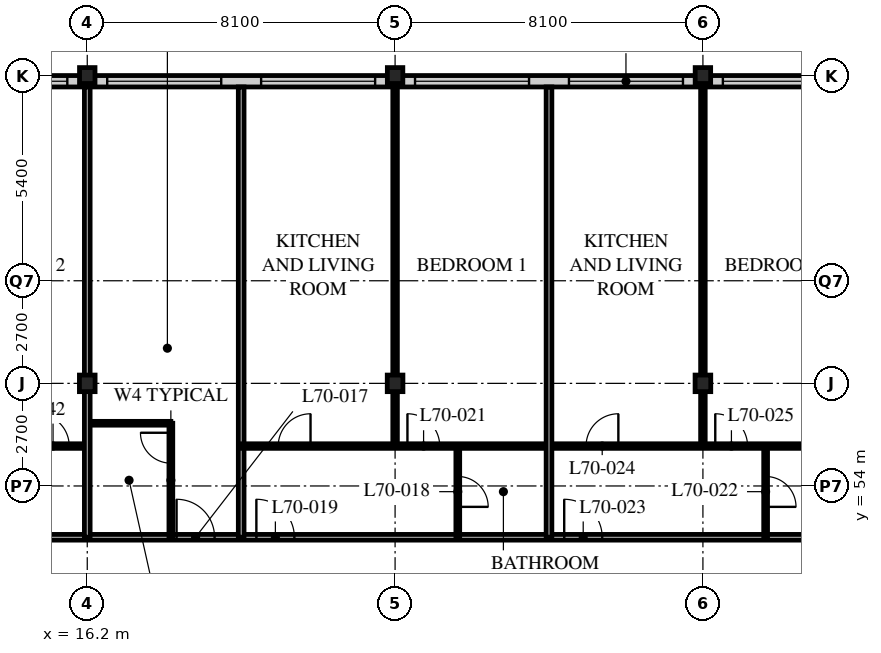
"""IFC4 building model, lengths in metres.
Left out: names, types, materials, properties, quantities, classifications, styles, units other than length and angle.
Written with IfcOpenShell. Run it as: python <this file> out.ifc"""

import sys

from ifc_helpers import new_model, si_unit, direction, frame, frame_2d, origin, origin_2d, place, context, subcontext, project, spatial, rectangle, i_section, extrude, element, fill, save


model = new_model("IFC4")
c1 = context("Model", 3, precision=1e-05, world=origin(), true_north=direction((0.0, 1.0)))
c2 = subcontext(c1, "Body", "Model", "MODEL_VIEW")
j1 = project(units=[si_unit("LENGTHUNIT", "METRE"), si_unit("PLANEANGLEUNIT", "RADIAN")], contexts=[c1])
p1 = place(None, origin())
s1 = spatial("IfcSite", under=j1, at=p1, CompositionType="ELEMENT")
p2 = place(p1, origin())
s2 = spatial("IfcBuilding", under=s1, at=p2, CompositionType="ELEMENT")
p3 = place(p2, frame((0.0, 0.0, 273.6)))
s3 = spatial("IfcBuildingStorey", under=s2, at=p3, CompositionType="ELEMENT", Elevation=273.6)
p4 = place(p3, frame((16.2, 56.7, 0.0), z_axis=(0.0, 0.0, 1.0), x_axis=(1.0, 0.0, 0.0)))
e1 = element("IfcColumn", 1, at=p4, inside=s3, PredefinedType="COLUMN", context=c2, shape_type="SweptSolid", body=[
    extrude(i_section(OverallWidth=0.412, OverallDepth=0.437, WebThickness=0.036, FlangeThickness=0.058, FilletRadius=0.015, at=origin_2d()), origin(), (0.0, 0.0, 1.0), 3.9),
])
p5 = place(p3, frame((16.2, 64.8, 0.0), z_axis=(0.0, 0.0, 1.0), x_axis=(1.0, 0.0, 0.0)))
e2 = element("IfcColumn", 2, at=p5, inside=s3, PredefinedType="COLUMN", context=c2, shape_type="SweptSolid", body=[
    extrude(i_section(OverallWidth=0.407, OverallDepth=0.419, WebThickness=0.031, FlangeThickness=0.049, FilletRadius=0.015, at=origin_2d()), origin(), (0.0, 0.0, 1.0), 3.9),
])
p6 = place(p3, frame((24.3, 56.7, 0.0), z_axis=(0.0, 0.0, 1.0), x_axis=(1.0, 0.0, 0.0)))
e3 = element("IfcColumn", 3, at=p6, inside=s3, PredefinedType="COLUMN", context=c2, shape_type="SweptSolid", body=[
    extrude(i_section(OverallWidth=0.412, OverallDepth=0.437, WebThickness=0.036, FlangeThickness=0.058, FilletRadius=0.015, at=origin_2d()), origin(), (0.0, 0.0, 1.0), 3.9),
])
p7 = place(p3, frame((24.3, 64.8, 0.0), z_axis=(0.0, 0.0, 1.0), x_axis=(1.0, 0.0, 0.0)))
e4 = element("IfcColumn", 4, at=p7, inside=s3, PredefinedType="COLUMN", context=c2, shape_type="SweptSolid", body=[
    extrude(i_section(OverallWidth=0.407, OverallDepth=0.419, WebThickness=0.031, FlangeThickness=0.049, FilletRadius=0.015, at=origin_2d()), origin(), (0.0, 0.0, 1.0), 3.9),
])
p8 = place(p3, frame((32.4, 56.7, 0.0), z_axis=(0.0, 0.0, 1.0), x_axis=(1.0, 0.0, 0.0)))
e5 = element("IfcColumn", 5, at=p8, inside=s3, PredefinedType="COLUMN", context=c2, shape_type="SweptSolid", body=[
    extrude(i_section(OverallWidth=0.412, OverallDepth=0.437, WebThickness=0.036, FlangeThickness=0.058, FilletRadius=0.015, at=origin_2d()), origin(), (0.0, 0.0, 1.0), 3.9),
])
p9 = place(p3, frame((32.4, 64.8, 0.0), z_axis=(0.0, 0.0, 1.0), x_axis=(1.0, 0.0, 0.0)))
e6 = element("IfcColumn", 6, at=p9, inside=s3, PredefinedType="COLUMN", context=c2, shape_type="SweptSolid", body=[
    extrude(i_section(OverallWidth=0.407, OverallDepth=0.419, WebThickness=0.031, FlangeThickness=0.049, FilletRadius=0.015, at=origin_2d()), origin(), (0.0, 0.0, 1.0), 3.9),
])
p10 = place(p3, frame((48.3, 64.65, 0.0), z_axis=(0.0, 0.0, 1.0), x_axis=(-1.0, 0.0, 0.0)))
e7 = element("IfcWall", 7, at=p10, inside=s3, PredefinedType="SOLIDWALL", context=c2, shape_type="SweptSolid", body=[
    extrude(rectangle(XDim=40.2, YDim=0.3, at=frame_2d((20.1, 0.0))), origin(), (0.0, 0.0, 1.0), 3.69),
])
p11 = place(p10, frame((0.225, 0.0, 0.6)))
e8 = element("IfcOpeningElement", 8, at=p11, cuts=e7, PredefinedType="OPENING", context=c2, shape_type="SweptSolid", body=[
    extrude(rectangle(XDim=3.0, YDim=2.4, at=frame_2d((1.5, 1.2))), frame((0.0, 0.16, 0.0), z_axis=(0.0, -1.0, 0.0), x_axis=(1.0, 0.0, 0.0)), (0.0, 0.0, 1.0), 0.32),
])
p12 = place(p10, frame((4.275, 0.0, 0.6)))
e9 = element("IfcOpeningElement", 9, at=p12, cuts=e7, PredefinedType="OPENING", context=c2, shape_type="SweptSolid", body=[
    extrude(rectangle(XDim=3.0, YDim=2.4, at=frame_2d((1.5, 1.2))), frame((0.0, 0.16, 0.0), z_axis=(0.0, -1.0, 0.0), x_axis=(1.0, 0.0, 0.0)), (0.0, 0.0, 1.0), 0.32),
])
p13 = place(p10, frame((8.325, 0.0, 0.6)))
e10 = element("IfcOpeningElement", 10, at=p13, cuts=e7, PredefinedType="OPENING", context=c2, shape_type="SweptSolid", body=[
    extrude(rectangle(XDim=3.0, YDim=2.4, at=frame_2d((1.5, 1.2))), frame((0.0, 0.16, 0.0), z_axis=(0.0, -1.0, 0.0), x_axis=(1.0, 0.0, 0.0)), (0.0, 0.0, 1.0), 0.32),
])
p14 = place(p10, frame((12.375, 0.0, 0.6)))
e11 = element("IfcOpeningElement", 11, at=p14, cuts=e7, PredefinedType="OPENING", context=c2, shape_type="SweptSolid", body=[
    extrude(rectangle(XDim=3.0, YDim=2.4, at=frame_2d((1.5, 1.2))), frame((0.0, 0.16, 0.0), z_axis=(0.0, -1.0, 0.0), x_axis=(1.0, 0.0, 0.0)), (0.0, 0.0, 1.0), 0.32),
])
p15 = place(p10, frame((16.425, 0.0, 0.6)))
e12 = element("IfcOpeningElement", 12, at=p15, cuts=e7, PredefinedType="OPENING", context=c2, shape_type="SweptSolid", body=[
    extrude(rectangle(XDim=3.0, YDim=2.4, at=frame_2d((1.5, 1.2))), frame((0.0, 0.16, 0.0), z_axis=(0.0, -1.0, 0.0), x_axis=(1.0, 0.0, 0.0)), (0.0, 0.0, 1.0), 0.32),
])
p16 = place(p10, frame((20.475, 0.0, 0.6)))
e13 = element("IfcOpeningElement", 13, at=p16, cuts=e7, PredefinedType="OPENING", context=c2, shape_type="SweptSolid", body=[
    extrude(rectangle(XDim=3.0, YDim=2.4, at=frame_2d((1.5, 1.2))), frame((0.0, 0.16, 0.0), z_axis=(0.0, -1.0, 0.0), x_axis=(1.0, 0.0, 0.0)), (0.0, 0.0, 1.0), 0.32),
])
p17 = place(p10, frame((24.525, 0.0, 0.6)))
e14 = element("IfcOpeningElement", 14, at=p17, cuts=e7, PredefinedType="OPENING", context=c2, shape_type="SweptSolid", body=[
    extrude(rectangle(XDim=3.0, YDim=2.4, at=frame_2d((1.5, 1.2))), frame((0.0, 0.16, 0.0), z_axis=(0.0, -1.0, 0.0), x_axis=(1.0, 0.0, 0.0)), (0.0, 0.0, 1.0), 0.32),
])
p18 = place(p10, frame((28.575, 0.0, 0.6)))
e15 = element("IfcOpeningElement", 15, at=p18, cuts=e7, PredefinedType="OPENING", context=c2, shape_type="SweptSolid", body=[
    extrude(rectangle(XDim=3.0, YDim=2.4, at=frame_2d((1.5, 1.2))), frame((0.0, 0.16, 0.0), z_axis=(0.0, -1.0, 0.0), x_axis=(1.0, 0.0, 0.0)), (0.0, 0.0, 1.0), 0.32),
])
p19 = place(p10, frame((32.625, 0.0, 0.6)))
e16 = element("IfcOpeningElement", 16, at=p19, cuts=e7, PredefinedType="OPENING", context=c2, shape_type="SweptSolid", body=[
    extrude(rectangle(XDim=3.0, YDim=2.4, at=frame_2d((1.5, 1.2))), frame((0.0, 0.16, 0.0), z_axis=(0.0, -1.0, 0.0), x_axis=(1.0, 0.0, 0.0)), (0.0, 0.0, 1.0), 0.32),
])
p20 = place(p10, frame((36.675, 0.0, 0.6)))
e17 = element("IfcOpeningElement", 17, at=p20, cuts=e7, PredefinedType="OPENING", context=c2, shape_type="SweptSolid", body=[
    extrude(rectangle(XDim=3.0, YDim=2.4, at=frame_2d((1.5, 1.2))), frame((0.0, 0.16, 0.0), z_axis=(0.0, -1.0, 0.0), x_axis=(1.0, 0.0, 0.0)), (0.0, 0.0, 1.0), 0.32),
])
p21 = place(p3, frame((12.15, 52.65, 0.0), z_axis=(0.0, 0.0, 1.0), x_axis=(1.0, 0.0, 0.0)))
e18 = element("IfcWall", 18, at=p21, inside=s3, PredefinedType="PARTITIONING", context=c2, shape_type="SweptSolid", body=[
    extrude(rectangle(XDim=24.3, YDim=0.15, at=frame_2d((12.15, 0.0))), origin(), (0.0, 0.0, 1.0), 3.69),
])
p22 = place(p21, frame((6.4, 0.0, 0.0)))
e19 = element("IfcOpeningElement", 19, at=p22, cuts=e18, PredefinedType="OPENING", context=c2, shape_type="SweptSolid", body=[
    extrude(rectangle(XDim=1.0, YDim=2.1, at=frame_2d((0.5, 1.05))), frame((0.0, 0.085, 0.0), z_axis=(0.0, -1.0, 0.0), x_axis=(1.0, 0.0, 0.0)), (0.0, 0.0, 1.0), 0.17),
])
p23 = place(p21, frame((8.5, 0.0, 0.0)))
e20 = element("IfcOpeningElement", 20, at=p23, cuts=e18, PredefinedType="OPENING", context=c2, shape_type="SweptSolid", body=[
    extrude(rectangle(XDim=1.0, YDim=2.1, at=frame_2d((0.5, 1.05))), frame((0.0, 0.085, 0.0), z_axis=(0.0, -1.0, 0.0), x_axis=(1.0, 0.0, 0.0)), (0.0, 0.0, 1.0), 0.17),
])
p24 = place(p21, frame((16.6, 0.0, 0.0)))
e21 = element("IfcOpeningElement", 21, at=p24, cuts=e18, PredefinedType="OPENING", context=c2, shape_type="SweptSolid", body=[
    extrude(rectangle(XDim=1.0, YDim=2.1, at=frame_2d((0.5, 1.05))), frame((0.0, 0.085, 0.0), z_axis=(0.0, -1.0, 0.0), x_axis=(1.0, 0.0, 0.0)), (0.0, 0.0, 1.0), 0.17),
])
p25 = place(p21, frame((1.525, 0.0, 0.0)))
e22 = element("IfcOpeningElement", 22, at=p25, cuts=e18, PredefinedType="OPENING", context=c2, shape_type="SweptSolid", body=[
    extrude(rectangle(XDim=1.0, YDim=2.1, at=frame_2d((0.5, 1.05))), frame((0.0, 0.085, 0.0), z_axis=(0.0, -1.0, 0.0), x_axis=(1.0, 0.0, 0.0)), (0.0, 0.0, 1.0), 0.17),
])
p26 = place(p3, frame((16.2, 55.65, 0.0), z_axis=(0.0, 0.0, 1.0), x_axis=(1.0, 0.0, 0.0)))
e23 = element("IfcWall", 23, at=p26, inside=s3, PredefinedType="PARTITIONING", context=c2, shape_type="SweptSolid", body=[
    extrude(rectangle(XDim=2.2, YDim=0.1, at=frame_2d((1.1, 0.0))), origin(), (0.0, 0.0, 1.0), 3.69),
])
p27 = place(p3, frame((18.4, 52.65, 0.0), z_axis=(0.0, 0.0, 1.0), x_axis=(0.0, 1.0, 0.0)))
e24 = element("IfcWall", 24, at=p27, inside=s3, PredefinedType="PARTITIONING", context=c2, shape_type="SweptSolid", body=[
    extrude(rectangle(XDim=3.0, YDim=0.1, at=frame_2d((1.5, 0.0))), origin(), (0.0, 0.0, 1.0), 3.69),
])
p28 = place(p27, frame((1.95, 0.0, 0.0)))
e25 = element("IfcOpeningElement", 25, at=p28, cuts=e24, PredefinedType="OPENING", context=c2, shape_type="SweptSolid", body=[
    extrude(rectangle(XDim=0.8, YDim=2.1, at=frame_2d((0.4, 1.05))), frame((0.0, 0.06, 0.0), z_axis=(0.0, -1.0, 0.0), x_axis=(1.0, 0.0, 0.0)), (0.0, 0.0, 1.0), 0.12),
])
p29 = place(p3, frame((20.25, 52.65, 0.0), z_axis=(0.0, 0.0, 1.0), x_axis=(0.0, 1.0, 0.0)))
e26 = element("IfcWall", 26, at=p29, inside=s3, PredefinedType="PARTITIONING", context=c2, shape_type="SweptSolid", body=[
    extrude(rectangle(XDim=11.85, YDim=0.15, at=frame_2d((5.925, 0.0))), origin(), (0.0, 0.0, 1.0), 3.69),
])
p30 = place(p3, frame((20.25, 55.05, 0.0), z_axis=(0.0, 0.0, 1.0), x_axis=(1.0, 0.0, 0.0)))
e27 = element("IfcWall", 27, at=p30, inside=s3, PredefinedType="PARTITIONING", context=c2, shape_type="SweptSolid", body=[
    extrude(rectangle(XDim=16.2, YDim=0.12, at=frame_2d((8.1, 0.0))), origin(), (0.0, 0.0, 1.0), 3.69),
])
p31 = place(p30, frame((0.975, 0.0, 0.0)))
e28 = element("IfcOpeningElement", 28, at=p31, cuts=e27, PredefinedType="OPENING", context=c2, shape_type="SweptSolid", body=[
    extrude(rectangle(XDim=0.85, YDim=2.1, at=frame_2d((0.425, 1.05))), frame((0.0, 0.07, 0.0), z_axis=(0.0, -1.0, 0.0), x_axis=(1.0, 0.0, 0.0)), (0.0, 0.0, 1.0), 0.14),
])
p32 = place(p30, frame((4.375, 0.0, 0.0)))
e29 = element("IfcOpeningElement", 29, at=p32, cuts=e27, PredefinedType="OPENING", context=c2, shape_type="SweptSolid", body=[
    extrude(rectangle(XDim=0.85, YDim=2.1, at=frame_2d((0.425, 1.05))), frame((0.0, 0.07, 0.0), z_axis=(0.0, -1.0, 0.0), x_axis=(1.0, 0.0, 0.0)), (0.0, 0.0, 1.0), 0.14),
])
p33 = place(p30, frame((9.075, 0.0, 0.0)))
e30 = element("IfcOpeningElement", 30, at=p33, cuts=e27, PredefinedType="OPENING", context=c2, shape_type="SweptSolid", body=[
    extrude(rectangle(XDim=0.85, YDim=2.1, at=frame_2d((0.425, 1.05))), frame((0.0, 0.07, 0.0), z_axis=(0.0, -1.0, 0.0), x_axis=(1.0, 0.0, 0.0)), (0.0, 0.0, 1.0), 0.14),
])
p34 = place(p30, frame((12.475, 0.0, 0.0)))
e31 = element("IfcOpeningElement", 31, at=p34, cuts=e27, PredefinedType="OPENING", context=c2, shape_type="SweptSolid", body=[
    extrude(rectangle(XDim=0.85, YDim=2.1, at=frame_2d((0.425, 1.05))), frame((0.0, 0.07, 0.0), z_axis=(0.0, -1.0, 0.0), x_axis=(1.0, 0.0, 0.0)), (0.0, 0.0, 1.0), 0.14),
])
p35 = place(p3, frame((25.95, 52.65, 0.0), z_axis=(0.0, 0.0, 1.0), x_axis=(0.0, 1.0, 0.0)))
e32 = element("IfcWall", 32, at=p35, inside=s3, PredefinedType="PARTITIONING", context=c2, shape_type="SweptSolid", body=[
    extrude(rectangle(XDim=2.4, YDim=0.1, at=frame_2d((1.2, 0.0))), origin(), (0.0, 0.0, 1.0), 3.69),
])
p36 = place(p35, frame((0.8, 0.0, 0.0)))
e33 = element("IfcOpeningElement", 33, at=p36, cuts=e32, PredefinedType="OPENING", context=c2, shape_type="SweptSolid", body=[
    extrude(rectangle(XDim=0.8, YDim=2.1, at=frame_2d((0.4, 1.05))), frame((0.0, 0.06, 0.0), z_axis=(0.0, -1.0, 0.0), x_axis=(1.0, 0.0, 0.0)), (0.0, 0.0, 1.0), 0.12),
])
p37 = place(p3, frame((24.3, 55.05, 0.0), z_axis=(0.0, 0.0, 1.0), x_axis=(0.0, 1.0, 0.0)))
e34 = element("IfcWall", 34, at=p37, inside=s3, PredefinedType="PARTITIONING", context=c2, shape_type="SweptSolid", body=[
    extrude(rectangle(XDim=9.45, YDim=0.12, at=frame_2d((4.725, 0.0))), origin(), (0.0, 0.0, 1.0), 3.078),
])
p38 = place(p3, frame((28.35, 52.65, 0.0), z_axis=(0.0, 0.0, 1.0), x_axis=(0.0, 1.0, 0.0)))
e35 = element("IfcWall", 35, at=p38, inside=s3, PredefinedType="PARTITIONING", context=c2, shape_type="SweptSolid", body=[
    extrude(rectangle(XDim=11.85, YDim=0.15, at=frame_2d((5.925, 0.0))), origin(), (0.0, 0.0, 1.0), 3.69),
])
p39 = place(p3, frame((34.05, 52.65, 0.0), z_axis=(0.0, 0.0, 1.0), x_axis=(0.0, 1.0, 0.0)))
e36 = element("IfcWall", 36, at=p39, inside=s3, PredefinedType="PARTITIONING", context=c2, shape_type="SweptSolid", body=[
    extrude(rectangle(XDim=2.4, YDim=0.1, at=frame_2d((1.2, 0.0))), origin(), (0.0, 0.0, 1.0), 3.69),
])
p40 = place(p39, frame((0.8, 0.0, 0.0)))
e37 = element("IfcOpeningElement", 37, at=p40, cuts=e36, PredefinedType="OPENING", context=c2, shape_type="SweptSolid", body=[
    extrude(rectangle(XDim=0.8, YDim=2.1, at=frame_2d((0.4, 1.05))), frame((0.0, 0.06, 0.0), z_axis=(0.0, -1.0, 0.0), x_axis=(1.0, 0.0, 0.0)), (0.0, 0.0, 1.0), 0.12),
])
p41 = place(p3, frame((32.4, 55.05, 0.0), z_axis=(0.0, 0.0, 1.0), x_axis=(0.0, 1.0, 0.0)))
e38 = element("IfcWall", 38, at=p41, inside=s3, PredefinedType="PARTITIONING", context=c2, shape_type="SweptSolid", body=[
    extrude(rectangle(XDim=9.45, YDim=0.12, at=frame_2d((4.725, 0.0))), origin(), (0.0, 0.0, 1.0), 3.078),
])
p42 = place(p3, frame((8.15, 55.05, 0.0), z_axis=(0.0, 0.0, 1.0), x_axis=(1.0, 0.0, 0.0)))
e39 = element("IfcWall", 39, at=p42, inside=s3, PredefinedType="PARTITIONING", context=c2, shape_type="SweptSolid", body=[
    extrude(rectangle(XDim=8.05, YDim=0.12, at=frame_2d((4.025, 0.0))), origin(), (0.0, 0.0, 1.0), 3.69),
])
p43 = place(p42, frame((6.725, 0.0, 0.0)))
e40 = element("IfcOpeningElement", 40, at=p43, cuts=e39, PredefinedType="OPENING", context=c2, shape_type="SweptSolid", body=[
    extrude(rectangle(XDim=0.85, YDim=2.1, at=frame_2d((0.425, 1.05))), frame((0.0, 0.07, 0.0), z_axis=(0.0, -1.0, 0.0), x_axis=(1.0, 0.0, 0.0)), (0.0, 0.0, 1.0), 0.14),
])
p44 = place(p42, frame((2.875, 0.0, 0.0)))
e41 = element("IfcOpeningElement", 41, at=p44, cuts=e39, PredefinedType="OPENING", context=c2, shape_type="SweptSolid", body=[
    extrude(rectangle(XDim=0.85, YDim=2.1, at=frame_2d((0.425, 1.05))), frame((0.0, 0.07, 0.0), z_axis=(0.0, -1.0, 0.0), x_axis=(1.0, 0.0, 0.0)), (0.0, 0.0, 1.0), 0.14),
])
p45 = place(p3, frame((16.2, 52.65, 0.0), z_axis=(0.0, 0.0, 1.0), x_axis=(0.0, 1.0, 0.0)))
e42 = element("IfcWall", 42, at=p45, inside=s3, PredefinedType="PARTITIONING", context=c2, shape_type="SweptSolid", body=[
    extrude(rectangle(XDim=11.85, YDim=0.15, at=frame_2d((5.925, 0.0))), origin(), (0.0, 0.0, 1.0), 3.078),
])
p46 = place(p14, origin())
e43 = element("IfcWindow", 43, at=p46, inside=s3, PartitioningType="SINGLE_PANEL", PredefinedType="WINDOW", context=c2, shape_type="SweptSolid", body=[
    extrude(rectangle(XDim=3.0, YDim=2.4, at=frame_2d((1.5, 1.2))), frame((0.0, 0.03, 0.0), z_axis=(0.0, -1.0, 0.0), x_axis=(1.0, 0.0, 0.0)), (0.0, 0.0, 1.0), 0.06),
])
fill(e11, e43)
p47 = place(p15, origin())
e44 = element("IfcWindow", 44, at=p47, inside=s3, PartitioningType="SINGLE_PANEL", PredefinedType="WINDOW", context=c2, shape_type="SweptSolid", body=[
    extrude(rectangle(XDim=3.0, YDim=2.4, at=frame_2d((1.5, 1.2))), frame((0.0, 0.03, 0.0), z_axis=(0.0, -1.0, 0.0), x_axis=(1.0, 0.0, 0.0)), (0.0, 0.0, 1.0), 0.06),
])
fill(e12, e44)
p48 = place(p16, origin())
e45 = element("IfcWindow", 45, at=p48, inside=s3, PartitioningType="SINGLE_PANEL", PredefinedType="WINDOW", context=c2, shape_type="SweptSolid", body=[
    extrude(rectangle(XDim=3.0, YDim=2.4, at=frame_2d((1.5, 1.2))), frame((0.0, 0.03, 0.0), z_axis=(0.0, -1.0, 0.0), x_axis=(1.0, 0.0, 0.0)), (0.0, 0.0, 1.0), 0.06),
])
fill(e13, e45)
p49 = place(p17, origin())
e46 = element("IfcWindow", 46, at=p49, inside=s3, PartitioningType="SINGLE_PANEL", PredefinedType="WINDOW", context=c2, shape_type="SweptSolid", body=[
    extrude(rectangle(XDim=3.0, YDim=2.4, at=frame_2d((1.5, 1.2))), frame((0.0, 0.03, 0.0), z_axis=(0.0, -1.0, 0.0), x_axis=(1.0, 0.0, 0.0)), (0.0, 0.0, 1.0), 0.06),
])
fill(e14, e46)
p50 = place(p18, origin())
e47 = element("IfcWindow", 47, at=p50, inside=s3, PartitioningType="SINGLE_PANEL", PredefinedType="WINDOW", context=c2, shape_type="SweptSolid", body=[
    extrude(rectangle(XDim=3.0, YDim=2.4, at=frame_2d((1.5, 1.2))), frame((0.0, 0.03, 0.0), z_axis=(0.0, -1.0, 0.0), x_axis=(1.0, 0.0, 0.0)), (0.0, 0.0, 1.0), 0.06),
])
fill(e15, e47)
p51 = place(p19, origin())
e48 = element("IfcWindow", 48, at=p51, inside=s3, PartitioningType="SINGLE_PANEL", PredefinedType="WINDOW", context=c2, shape_type="SweptSolid", body=[
    extrude(rectangle(XDim=3.0, YDim=2.4, at=frame_2d((1.5, 1.2))), frame((0.0, 0.03, 0.0), z_axis=(0.0, -1.0, 0.0), x_axis=(1.0, 0.0, 0.0)), (0.0, 0.0, 1.0), 0.06),
])
fill(e16, e48)
p52 = place(p28, origin())
e49 = element("IfcDoor", 49, at=p52, inside=s3, OperationType="SINGLE_SWING_RIGHT", PredefinedType="DOOR", context=c2, shape_type="SweptSolid", body=[
    extrude(rectangle(XDim=0.8, YDim=2.1, at=frame_2d((0.4, 1.05))), frame((0.0, 0.025, 0.0), z_axis=(0.0, -1.0, 0.0), x_axis=(1.0, 0.0, 0.0)), (0.0, 0.0, 1.0), 0.05),
])
fill(e25, e49)
p53 = place(p22, origin())
e50 = element("IfcDoor", 50, at=p53, inside=s3, OperationType="SINGLE_SWING_LEFT", PredefinedType="DOOR", context=c2, shape_type="SweptSolid", body=[
    extrude(rectangle(XDim=1.0, YDim=2.1, at=frame_2d((0.5, 1.05))), frame((0.0, 0.025, 0.0), z_axis=(0.0, -1.0, 0.0), x_axis=(1.0, 0.0, 0.0)), (0.0, 0.0, 1.0), 0.05),
])
fill(e19, e50)
p54 = place(p36, origin())
e51 = element("IfcDoor", 51, at=p54, inside=s3, OperationType="SINGLE_SWING_RIGHT", PredefinedType="DOOR", context=c2, shape_type="SweptSolid", body=[
    extrude(rectangle(XDim=0.8, YDim=2.1, at=frame_2d((0.4, 1.05))), frame((0.0, 0.025, 0.0), z_axis=(0.0, -1.0, 0.0), x_axis=(1.0, 0.0, 0.0)), (0.0, 0.0, 1.0), 0.05),
])
fill(e33, e51)
p55 = place(p23, origin())
e52 = element("IfcDoor", 52, at=p55, inside=s3, OperationType="SINGLE_SWING_LEFT", PredefinedType="DOOR", context=c2, shape_type="SweptSolid", body=[
    extrude(rectangle(XDim=1.0, YDim=2.1, at=frame_2d((0.5, 1.05))), frame((0.0, 0.025, 0.0), z_axis=(0.0, -1.0, 0.0), x_axis=(1.0, 0.0, 0.0)), (0.0, 0.0, 1.0), 0.05),
])
fill(e20, e52)
p56 = place(p31, origin())
e53 = element("IfcDoor", 53, at=p56, inside=s3, OperationType="SINGLE_SWING_RIGHT", PredefinedType="DOOR", context=c2, shape_type="SweptSolid", body=[
    extrude(rectangle(XDim=0.85, YDim=2.1, at=frame_2d((0.425, 1.05))), frame((0.0, 0.025, 0.0), z_axis=(0.0, -1.0, 0.0), x_axis=(1.0, 0.0, 0.0)), (0.0, 0.0, 1.0), 0.05),
])
fill(e28, e53)
p57 = place(p32, origin())
e54 = element("IfcDoor", 54, at=p57, inside=s3, OperationType="SINGLE_SWING_LEFT", PredefinedType="DOOR", context=c2, shape_type="SweptSolid", body=[
    extrude(rectangle(XDim=0.85, YDim=2.1, at=frame_2d((0.425, 1.05))), frame((0.0, 0.025, 0.0), z_axis=(0.0, -1.0, 0.0), x_axis=(1.0, 0.0, 0.0)), (0.0, 0.0, 1.0), 0.05),
])
fill(e29, e54)
p58 = place(p40, origin())
e55 = element("IfcDoor", 55, at=p58, inside=s3, OperationType="SINGLE_SWING_RIGHT", PredefinedType="DOOR", context=c2, shape_type="SweptSolid", body=[
    extrude(rectangle(XDim=0.8, YDim=2.1, at=frame_2d((0.4, 1.05))), frame((0.0, 0.025, 0.0), z_axis=(0.0, -1.0, 0.0), x_axis=(1.0, 0.0, 0.0)), (0.0, 0.0, 1.0), 0.05),
])
fill(e37, e55)
p59 = place(p24, origin())
e56 = element("IfcDoor", 56, at=p59, inside=s3, OperationType="SINGLE_SWING_LEFT", PredefinedType="DOOR", context=c2, shape_type="SweptSolid", body=[
    extrude(rectangle(XDim=1.0, YDim=2.1, at=frame_2d((0.5, 1.05))), frame((0.0, 0.025, 0.0), z_axis=(0.0, -1.0, 0.0), x_axis=(1.0, 0.0, 0.0)), (0.0, 0.0, 1.0), 0.05),
])
fill(e21, e56)
p60 = place(p33, origin())
e57 = element("IfcDoor", 57, at=p60, inside=s3, OperationType="SINGLE_SWING_RIGHT", PredefinedType="DOOR", context=c2, shape_type="SweptSolid", body=[
    extrude(rectangle(XDim=0.85, YDim=2.1, at=frame_2d((0.425, 1.05))), frame((0.0, 0.025, 0.0), z_axis=(0.0, -1.0, 0.0), x_axis=(1.0, 0.0, 0.0)), (0.0, 0.0, 1.0), 0.05),
])
fill(e30, e57)
p61 = place(p34, origin())
e58 = element("IfcDoor", 58, at=p61, inside=s3, OperationType="SINGLE_SWING_LEFT", PredefinedType="DOOR", context=c2, shape_type="SweptSolid", body=[
    extrude(rectangle(XDim=0.85, YDim=2.1, at=frame_2d((0.425, 1.05))), frame((0.0, 0.025, 0.0), z_axis=(0.0, -1.0, 0.0), x_axis=(1.0, 0.0, 0.0)), (0.0, 0.0, 1.0), 0.05),
])
fill(e31, e58)
p62 = place(p43, origin())
e59 = element("IfcDoor", 59, at=p62, inside=s3, OperationType="SINGLE_SWING_LEFT", PredefinedType="DOOR", context=c2, shape_type="SweptSolid", body=[
    extrude(rectangle(XDim=0.85, YDim=2.1, at=frame_2d((0.425, 1.05))), frame((0.0, 0.025, 0.0), z_axis=(0.0, -1.0, 0.0), x_axis=(1.0, 0.0, 0.0)), (0.0, 0.0, 1.0), 0.05),
])
fill(e40, e59)
save(model, sys.argv[1])
